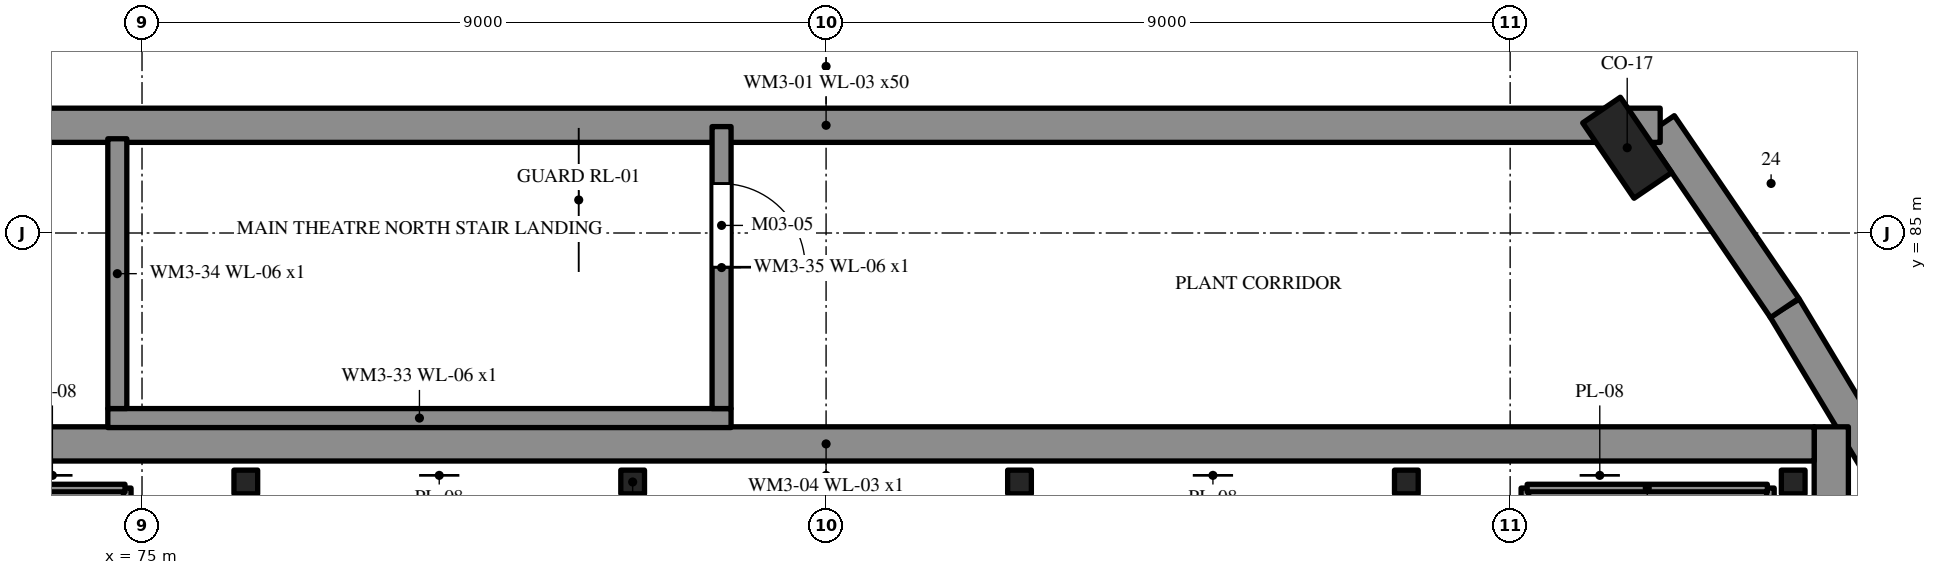
"""IFC4 building model, lengths in metres.
Left out: names, types, materials, properties, quantities, classifications, styles, units other than length and angle.
Written with IfcOpenShell. Run it as: python <this file> out.ifc"""

import sys

from ifc_helpers import new_model, si_unit, direction, frame, frame_2d, origin, origin_2d, place, context, subcontext, project, spatial, polyline, rectangle, i_section, outline, extrude, element, fill, save


model = new_model("IFC4")
c1 = context("Model", 3, precision=1e-05, world=origin(), true_north=direction((0.0, 1.0)))
c2 = subcontext(c1, "Body", "Model", "MODEL_VIEW")
j1 = project(units=[si_unit("LENGTHUNIT", "METRE"), si_unit("PLANEANGLEUNIT", "RADIAN")], contexts=[c1])
p1 = place(None, origin())
s1 = spatial("IfcSite", under=j1, at=p1, CompositionType="ELEMENT")
p2 = place(p1, origin())
s2 = spatial("IfcBuilding", under=s1, at=p2, CompositionType="ELEMENT")
p3 = place(p2, frame((0.0, 0.0, 14.8)))
s3 = spatial("IfcBuildingStorey", under=s2, at=p3, CompositionType="ELEMENT", Elevation=14.8)
p4 = place(p3, frame((98.169, 81.425, 0.0), z_axis=(0.0, 0.0, 1.0), x_axis=(-0.515636119523, 0.856807675177, 0.0)))
e1 = element("IfcWall", 1, at=p4, inside=s3, PredefinedType="SOLIDWALL", context=c2, shape_type="SweptSolid", body=[
    extrude(outline(polyline([(0.0, 0.0), (3.021, 0.0), (3.021, 2.856), (0.0, 1.956), (0.0, 0.0)])), frame((0.0, 0.225, 0.0), z_axis=(0.0, -1.0, 0.0), x_axis=(1.0, 0.0, 0.0)), (0.0, 0.0, 1.0), 0.45),
])
p5 = place(p3, frame((96.611, 84.014, 0.0), z_axis=(0.0, 0.0, 1.0), x_axis=(-0.5629642644, 0.826481238147, 0.0)))
e2 = element("IfcWall", 2, at=p5, inside=s3, PredefinedType="SOLIDWALL", context=c2, shape_type="SweptSolid", body=[
    extrude(outline(polyline([(0.0, 0.0), (2.908, 0.0), (2.908, 3.761), (2.833, 3.738), (2.76, 3.715), (0.0, 2.861), (0.0, 0.0)])), frame((0.0, 0.225, 0.0), z_axis=(0.0, -1.0, 0.0), x_axis=(1.0, 0.0, 0.0)), (0.0, 0.0, 1.0), 0.45),
])
p6 = place(p3, frame((94.974, 86.417, 0.0), z_axis=(0.0, 0.0, 1.0), x_axis=(-1.0, 0.0, 0.0)))
e3 = element("IfcWall", 3, at=p6, inside=s3, PredefinedType="SOLIDWALL", context=c2, shape_type="SweptSolid", body=[
    extrude(outline(polyline([(0.0, 0.0), (21.948, 0.0), (21.948, 3.671), (21.872, 3.671), (21.787, 3.671), (21.55, 3.671), (0.398, 3.671), (0.161, 3.671), (0.076, 3.671), (0.0, 3.671), (0.0, 0.0)])), frame((0.0, 0.225, 0.0), z_axis=(0.0, -1.0, 0.0), x_axis=(1.0, 0.0, 0.0)), (0.0, 0.0, 1.0), 0.45),
])
p7 = place(p3, frame((97.225, 55.4, 0.0), z_axis=(0.0, 0.0, 1.0), x_axis=(0.0, 1.0, 0.0)))
e4 = element("IfcWall", 4, at=p7, inside=s3, PredefinedType="SOLIDWALL", context=c2, shape_type="SweptSolid", body=[
    extrude(rectangle(XDim=27.05, YDim=0.45, at=frame_2d((13.525, 0.0))), origin(), (0.0, 0.0, 1.0), 4.6),
])
p8 = place(p7, frame((10.0, 0.0, 0.0)))
e5 = element("IfcOpeningElement", 5, at=p8, cuts=e4, PredefinedType="OPENING", context=c2, shape_type="SweptSolid", body=[
    extrude(rectangle(XDim=1.0, YDim=2.1, at=frame_2d((0.5, 1.05))), frame((0.0, 0.235, 0.0), z_axis=(0.0, -1.0, 0.0), x_axis=(1.0, 0.0, 0.0)), (0.0, 0.0, 1.0), 0.47),
])
p9 = place(p3, frame((71.0, 82.225, 0.0), z_axis=(0.0, 0.0, 1.0), x_axis=(1.0, 0.0, 0.0)))
e6 = element("IfcWall", 6, at=p9, inside=s3, PredefinedType="SOLIDWALL", context=c2, shape_type="SweptSolid", body=[
    extrude(rectangle(XDim=26.0, YDim=0.45, at=frame_2d((13.0, 0.0))), origin(), (0.0, 0.0, 1.0), 4.6),
])
p10 = place(p3, frame((94.54, 86.122, 0.0), z_axis=(0.0, 0.0, 1.0), x_axis=(-0.562978035902, 0.82647185741, 0.0)))
e7 = element("IfcColumn", 7, at=p10, inside=s3, PredefinedType="PILASTER", context=c2, shape_type="SweptSolid", body=[
    extrude(rectangle(XDim=1.2, YDim=0.6, at=origin_2d()), origin(), (0.0, 0.0, 1.0), 3.038),
])
p11 = place(p3, frame((74.55, 82.565, 0.0), z_axis=(0.0, 0.0, 1.0), x_axis=(1.0, 0.0, 0.0)))
e8 = element("IfcWall", 8, at=p11, inside=s3, PredefinedType="SHEAR", context=c2, shape_type="SweptSolid", body=[
    extrude(rectangle(XDim=8.2, YDim=0.25, at=frame_2d((4.1, 0.0))), origin(), (0.0, 0.0, 1.0), 3.463),
])
p12 = place(p3, frame((74.675, 82.69, 0.0), z_axis=(0.0, 0.0, 1.0), x_axis=(0.0, 1.0, 0.0)))
e9 = element("IfcWall", 9, at=p12, inside=s3, PredefinedType="SHEAR", context=c2, shape_type="SweptSolid", body=[
    extrude(rectangle(XDim=3.55, YDim=0.25, at=frame_2d((1.775, 0.0))), origin(), (0.0, 0.0, 1.0), 3.463),
])
p13 = place(p3, frame((82.625, 86.4, 0.0), z_axis=(0.0, 0.0, 1.0), x_axis=(0.0, -1.0, 0.0)))
e10 = element("IfcWall", 10, at=p13, inside=s3, PredefinedType="SHEAR", context=c2, shape_type="SweptSolid", body=[
    extrude(rectangle(XDim=3.71, YDim=0.25, at=frame_2d((1.855, 0.0))), origin(), (0.0, 0.0, 1.0), 3.463),
])
p14 = place(p13, frame((0.75, 0.0, 0.0)))
e11 = element("IfcOpeningElement", 11, at=p14, cuts=e10, PredefinedType="OPENING", context=c2, shape_type="SweptSolid", body=[
    extrude(rectangle(XDim=1.1, YDim=2.1, at=frame_2d((0.55, 1.05))), frame((0.0, 0.135, 0.0), z_axis=(0.0, -1.0, 0.0), x_axis=(1.0, 0.0, 0.0)), (0.0, 0.0, 1.0), 0.27),
])
for number, where, z_axis, x_axis in (
    (12, (76.365, 81.724, 0.0), (0.0, 0.0, 1.0), (1.0, 0.0, 0.0)),
    (13, (81.455, 81.724, 0.0), (0.0, 0.0, 1.0), (1.0, 0.0, 0.0)),
    (14, (86.545, 81.724, 0.0), (0.0, 0.0, 1.0), (1.0, 0.0, 0.0)),
    (15, (91.635, 81.724, 0.0), (0.0, 0.0, 1.0), (1.0, 0.0, 0.0)),
    (16, (96.724, 81.724, 0.0), (0.0, 0.0, 1.0), (1.0, 0.0, 0.0)),
):
    element("IfcColumn", number, at=place(p3, frame(where, z_axis=z_axis, x_axis=x_axis)), inside=s3, PredefinedType="COLUMN", context=c2, shape_type="SweptSolid", body=[
        extrude(i_section(OverallWidth=0.312, OverallDepth=0.312, WebThickness=0.017, FlangeThickness=0.017, FilletRadius=0.016, at=origin_2d()), origin(), (0.0, 0.0, 1.0), 4.6),
    ])
p15 = place(p3, frame((74.806, 70.0, 0.0), z_axis=(0.0, 0.0, 1.0), x_axis=(0.0, 1.0, 0.0)))
e17 = element("IfcWall", 17, at=p15, inside=s3, PredefinedType="PARTITIONING", context=c2, shape_type="SweptSolid", body=[
    extrude(rectangle(XDim=11.644, YDim=0.1, at=frame_2d((5.822, 0.0))), origin(), (0.0, 0.0, 1.0), 4.04),
])
p16 = place(p15, frame((1.5, 0.0, 0.0)))
e18 = element("IfcOpeningElement", 18, at=p16, cuts=e17, PredefinedType="OPENING", context=c2, shape_type="SweptSolid", body=[
    extrude(rectangle(XDim=0.9, YDim=2.1, at=frame_2d((0.45, 1.05))), frame((0.0, 0.06, 0.0), z_axis=(0.0, -1.0, 0.0), x_axis=(1.0, 0.0, 0.0)), (0.0, 0.0, 1.0), 0.12),
])
p17 = place(p15, frame((5.4, 0.0, 0.0)))
e19 = element("IfcOpeningElement", 19, at=p17, cuts=e17, PredefinedType="OPENING", context=c2, shape_type="SweptSolid", body=[
    extrude(rectangle(XDim=0.9, YDim=2.1, at=frame_2d((0.45, 1.05))), frame((0.0, 0.06, 0.0), z_axis=(0.0, -1.0, 0.0), x_axis=(1.0, 0.0, 0.0)), (0.0, 0.0, 1.0), 0.12),
])
p18 = place(p15, frame((9.272, 0.0, 0.0)))
e20 = element("IfcOpeningElement", 20, at=p18, cuts=e17, PredefinedType="OPENING", context=c2, shape_type="SweptSolid", body=[
    extrude(rectangle(XDim=0.9, YDim=2.1, at=frame_2d((0.45, 1.05))), frame((0.0, 0.06, 0.0), z_axis=(0.0, -1.0, 0.0), x_axis=(1.0, 0.0, 0.0)), (0.0, 0.0, 1.0), 0.12),
])
p19 = place(p3, frame((71.606, 81.644, 0.0), z_axis=(0.0, 0.0, 1.0), x_axis=(1.0, 0.0, 0.0)))
e21 = element("IfcWall", 21, at=p19, inside=s3, PredefinedType="PARTITIONING", context=c2, shape_type="SweptSolid", body=[
    extrude(rectangle(XDim=3.17, YDim=0.1, at=frame_2d((1.585, 0.0))), origin(), (0.0, 0.0, 1.0), 4.04),
])
p20 = place(p3, frame((96.424, 70.0, 0.0), z_axis=(0.0, 0.0, 1.0), x_axis=(0.0, 1.0, 0.0)))
e22 = element("IfcWall", 22, at=p20, inside=s3, PredefinedType="PARTITIONING", context=c2, shape_type="SweptSolid", body=[
    extrude(rectangle(XDim=11.644, YDim=0.1, at=frame_2d((5.822, 0.0))), origin(), (0.0, 0.0, 1.0), 4.04),
])
p21 = place(p3, frame((93.194, 70.0, 0.0), z_axis=(0.0, 0.0, 1.0), x_axis=(0.0, 1.0, 0.0)))
e23 = element("IfcWall", 23, at=p21, inside=s3, PredefinedType="PARTITIONING", context=c2, shape_type="SweptSolid", body=[
    extrude(rectangle(XDim=11.644, YDim=0.1, at=frame_2d((5.822, 0.0))), origin(), (0.0, 0.0, 1.0), 4.04),
])
p22 = place(p21, frame((1.5, 0.0, 0.0)))
e24 = element("IfcOpeningElement", 24, at=p22, cuts=e23, PredefinedType="OPENING", context=c2, shape_type="SweptSolid", body=[
    extrude(rectangle(XDim=0.9, YDim=2.1, at=frame_2d((0.45, 1.05))), frame((0.0, 0.06, 0.0), z_axis=(0.0, -1.0, 0.0), x_axis=(1.0, 0.0, 0.0)), (0.0, 0.0, 1.0), 0.12),
])
p23 = place(p21, frame((5.4, 0.0, 0.0)))
e25 = element("IfcOpeningElement", 25, at=p23, cuts=e23, PredefinedType="OPENING", context=c2, shape_type="SweptSolid", body=[
    extrude(rectangle(XDim=0.9, YDim=2.1, at=frame_2d((0.45, 1.05))), frame((0.0, 0.06, 0.0), z_axis=(0.0, -1.0, 0.0), x_axis=(1.0, 0.0, 0.0)), (0.0, 0.0, 1.0), 0.12),
])
p24 = place(p21, frame((9.272, 0.0, 0.0)))
e26 = element("IfcOpeningElement", 26, at=p24, cuts=e23, PredefinedType="OPENING", context=c2, shape_type="SweptSolid", body=[
    extrude(rectangle(XDim=0.9, YDim=2.1, at=frame_2d((0.45, 1.05))), frame((0.0, 0.06, 0.0), z_axis=(0.0, -1.0, 0.0), x_axis=(1.0, 0.0, 0.0)), (0.0, 0.0, 1.0), 0.12),
])
p25 = place(p3, frame((96.384, 81.644, 0.0), z_axis=(0.0, 0.0, 1.0), x_axis=(-1.0, 0.0, 0.0)))
e27 = element("IfcWall", 27, at=p25, inside=s3, PredefinedType="PARTITIONING", context=c2, shape_type="SweptSolid", body=[
    extrude(rectangle(XDim=3.16, YDim=0.1, at=frame_2d((1.58, 0.0))), origin(), (0.0, 0.0, 1.0), 4.04),
])
p26 = place(p14, origin())
e28 = element("IfcDoor", 28, at=p26, inside=s3, OperationType="SINGLE_SWING_RIGHT", PredefinedType="DOOR", context=c2, shape_type="SweptSolid", body=[
    extrude(rectangle(XDim=1.1, YDim=2.1, at=frame_2d((0.55, 1.05))), frame((0.0, 0.025, 0.0), z_axis=(0.0, -1.0, 0.0), x_axis=(1.0, 0.0, 0.0)), (0.0, 0.0, 1.0), 0.05),
])
fill(e11, e28)
save(model, sys.argv[1])
